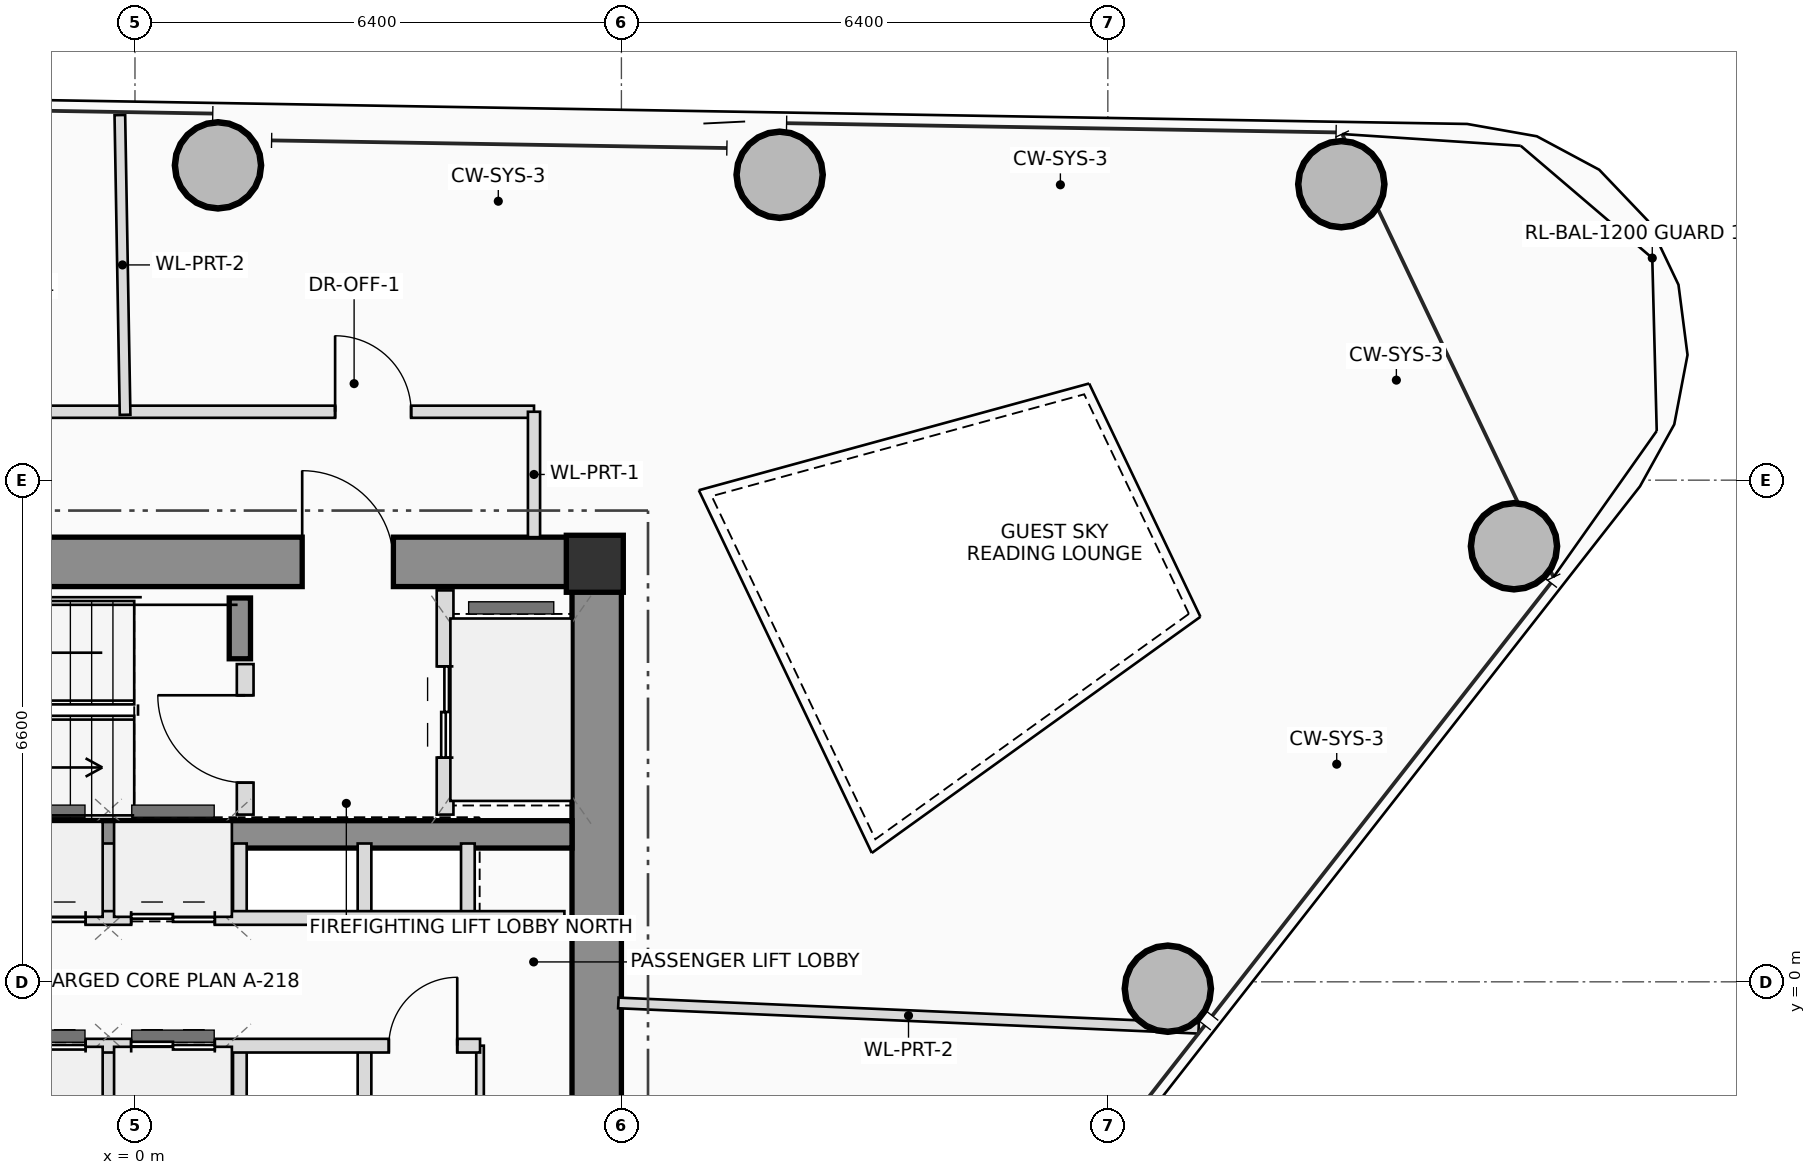
"""IFC4 building model, lengths in metres.
Left out: names, types, materials, properties, quantities, classifications, styles, units other than length and angle.
Written with IfcOpenShell. Run it as: python <this file> out.ifc"""

import sys

from ifc_helpers import new_model, si_unit, direction, frame, frame_2d, origin, origin_2d, place, context, subcontext, project, spatial, rectangle, hollow_circle, extrude, source, transform, mapped, element, fill, save


model = new_model("IFC4")
c1 = context("Model", 3, precision=1e-05, world=origin(), true_north=direction((0.0, 1.0)))
c2 = subcontext(c1, "Body", "Model", "MODEL_VIEW")
j1 = project(units=[si_unit("LENGTHUNIT", "METRE"), si_unit("PLANEANGLEUNIT", "RADIAN")], contexts=[c1])
p1 = place(None, origin())
s1 = spatial("IfcSite", under=j1, at=p1, CompositionType="ELEMENT")
p2 = place(p1, origin())
s2 = spatial("IfcBuilding", under=s1, at=p2, CompositionType="ELEMENT")
p3 = place(p2, frame((0.0, 0.0, 198.35)))
s3 = spatial("IfcBuildingStorey", under=s2, at=p3, CompositionType="ELEMENT", Elevation=198.35)
m1 = source(origin(), c2, "Body", "SweptSolid", [
    extrude(rectangle(XDim=0.75, YDim=0.75, at=origin_2d()), origin(), (0.0, 0.0, 1.0), 3.45),
])
p4 = place(p3, frame((6.05, 5.5, 0.0), z_axis=(0.0, 0.0, 1.0), x_axis=(1.0, 0.0, 0.0)))
e1 = element("IfcColumn", 1, at=p4, inside=s3, PredefinedType="COLUMN", context=c2, shape_type="MappedRepresentation", body=[
    mapped(m1, transform((0.0, 0.0, 0.0), scale=1.0)),
])
p5 = place(p3, frame((-6.4, 5.525, 0.0), z_axis=(0.0, 0.0, 1.0), x_axis=(1.0, 0.0, 0.0)))
e2 = element("IfcWall", 2, at=p5, inside=s3, PredefinedType="SHEAR", context=c2, shape_type="SweptSolid", body=[
    extrude(rectangle(XDim=12.8, YDim=0.65, at=frame_2d((6.4, 0.0))), origin(), (0.0, 0.0, 1.0), 3.45),
])
p6 = place(p5, frame((8.6, 0.0, 0.0)))
e3 = element("IfcOpeningElement", 3, at=p6, cuts=e2, PredefinedType="OPENING", context=c2, shape_type="SweptSolid", body=[
    extrude(rectangle(XDim=1.2, YDim=2.2, at=frame_2d((0.6, 1.1))), frame((0.0, 0.335, 0.0), z_axis=(0.0, -1.0, 0.0), x_axis=(1.0, 0.0, 0.0)), (0.0, 0.0, 1.0), 0.67),
])
p7 = place(p3, frame((6.075, -5.2, 0.0), z_axis=(0.0, 0.0, 1.0), x_axis=(0.0, 1.0, 0.0)))
e4 = element("IfcWall", 4, at=p7, inside=s3, PredefinedType="SHEAR", context=c2, shape_type="SweptSolid", body=[
    extrude(rectangle(XDim=10.4, YDim=0.65, at=frame_2d((5.2, 0.0))), origin(), (0.0, 0.0, 1.0), 3.45),
])
p8 = place(p3, frame((-5.75, 1.94, 0.0), z_axis=(0.0, 0.0, 1.0), x_axis=(1.0, 0.0, 0.0)))
e5 = element("IfcWall", 5, at=p8, inside=s3, PredefinedType="SHEAR", context=c2, shape_type="SweptSolid", body=[
    extrude(rectangle(XDim=11.5, YDim=0.36, at=frame_2d((5.75, 0.0))), origin(), (0.0, 0.0, 1.0), 3.45),
])
p9 = place(p3, frame((1.38, 4.25, 0.0), z_axis=(0.0, 0.0, 1.0), x_axis=(0.0, 1.0, 0.0)))
e6 = element("IfcWall", 6, at=p9, inside=s3, PredefinedType="SHEAR", context=c2, shape_type="SweptSolid", body=[
    extrude(rectangle(XDim=0.8, YDim=0.28, at=frame_2d((0.4, 0.0))), origin(), (0.0, 0.0, 1.0), 3.45),
])
m2 = source(origin(), c2, "Body", "SweptSolid", [
    extrude(hollow_circle(Radius=0.575, WallThickness=0.042, at=origin_2d()), origin(), (0.0, 0.0, 1.0), 3.45),
])
for number, where, z_axis, x_axis in (
    (7, (13.59, -0.09, 0.0), (0.0, 0.0, 1.0), (1.0, 0.0, 0.0)),
    (8, (18.144, 5.731, 0.0), (0.0, 0.0, 1.0), (1.0, 0.0, 0.0)),
    (9, (15.872, 10.494, 0.0), (0.0, 0.0, 1.0), (1.0, 0.0, 0.0)),
    (10, (8.482, 10.618, 0.0), (0.0, 0.0, 1.0), (1.0, 0.0, 0.0)),
    (11, (1.092, 10.742, 0.0), (0.0, 0.0, 1.0), (1.0, 0.0, 0.0)),
):
    element("IfcColumn", number, at=place(p3, frame(where, z_axis=z_axis, x_axis=x_axis)), inside=s3, PredefinedType="COLUMN", context=c2, shape_type="MappedRepresentation", body=[
        mapped(m2, transform((0.0, 0.0, 0.0), scale=1.0)),
    ])
p10 = place(p3, frame((1.45, 2.2, 0.0), z_axis=(0.0, 0.0, 1.0), x_axis=(0.0, 1.0, 0.0)))
e12 = element("IfcWall", 12, at=p10, inside=s3, PredefinedType="PLUMBINGWALL", context=c2, shape_type="SweptSolid", body=[
    extrude(rectangle(XDim=1.98, YDim=0.22, at=frame_2d((0.99, 0.0))), origin(), (0.0, 0.0, 1.0), 3.25),
])
p11 = place(p10, frame((0.42, 0.0, 0.0)))
e13 = element("IfcOpeningElement", 13, at=p11, cuts=e12, PredefinedType="OPENING", context=c2, shape_type="SweptSolid", body=[
    extrude(rectangle(XDim=1.15, YDim=2.15, at=frame_2d((0.575, 1.075))), frame((0.0, 0.12, 0.0), z_axis=(0.0, -1.0, 0.0), x_axis=(1.0, 0.0, 0.0)), (0.0, 0.0, 1.0), 0.24),
])
p12 = place(p3, frame((4.08, 2.2, 0.0), z_axis=(0.0, 0.0, 1.0), x_axis=(0.0, 1.0, 0.0)))
e14 = element("IfcWall", 14, at=p12, inside=s3, PredefinedType="PLUMBINGWALL", context=c2, shape_type="SweptSolid", body=[
    extrude(rectangle(XDim=2.95, YDim=0.22, at=frame_2d((1.475, 0.0))), origin(), (0.0, 0.0, 1.0), 3.25),
])
p13 = place(p12, frame((0.75, 0.0, 0.0)))
e15 = element("IfcOpeningElement", 15, at=p13, cuts=e14, PredefinedType="OPENING", context=c2, shape_type="SweptSolid", body=[
    extrude(rectangle(XDim=1.2, YDim=2.25, at=frame_2d((0.6, 1.125))), frame((0.0, 0.12, 0.0), z_axis=(0.0, -1.0, 0.0), x_axis=(1.0, 0.0, 0.0)), (0.0, 0.0, 1.0), 0.24),
])
for number, where, z_axis, x_axis in (
    (16, (-0.35, 0.84, 0.0), (0.0, 0.0, 1.0), (0.0, 1.0, 0.0)),
    (17, (-0.35, -1.82, 0.0), (0.0, 0.0, 1.0), (0.0, 1.0, 0.0)),
    (18, (1.38, 0.84, 0.0), (0.0, 0.0, 1.0), (0.0, 1.0, 0.0)),
    (19, (1.38, -1.82, 0.0), (0.0, 0.0, 1.0), (0.0, 1.0, 0.0)),
    (20, (3.02, 0.84, 0.0), (0.0, 0.0, 1.0), (0.0, 1.0, 0.0)),
    (21, (4.38, 0.84, 0.0), (0.0, 0.0, 1.0), (0.0, 1.0, 0.0)),
    (22, (3.02, -1.82, 0.0), (0.0, 0.0, 1.0), (0.0, 1.0, 0.0)),
):
    element("IfcWall", number, at=place(p3, frame(where, z_axis=z_axis, x_axis=x_axis)), inside=s3, PredefinedType="PLUMBINGWALL", context=c2, shape_type="SweptSolid", body=[
        extrude(rectangle(XDim=0.98, YDim=0.18, at=frame_2d((0.49, 0.0))), origin(), (0.0, 0.0, 1.0), 3.25),
    ])
p14 = place(p3, frame((4.54, -1.82, 0.0), z_axis=(0.0, 0.0, 1.0), x_axis=(0.0, 1.0, 0.0)))
e23 = element("IfcWall", 23, at=p14, inside=s3, PredefinedType="PARTITIONING", context=c2, shape_type="SweptSolid", body=[
    extrude(rectangle(XDim=0.98, YDim=0.1, at=frame_2d((0.49, 0.0))), origin(), (0.0, 0.0, 1.0), 3.25),
])
p15 = place(p3, frame((-5.68, 0.84, 0.0), z_axis=(0.0, 0.0, 1.0), x_axis=(1.0, 0.0, 0.0)))
e24 = element("IfcWall", 24, at=p15, inside=s3, PredefinedType="PLUMBINGWALL", context=c2, shape_type="SweptSolid", body=[
    extrude(rectangle(XDim=11.33, YDim=0.18, at=frame_2d((5.665, 0.0))), origin(), (0.0, 0.0, 1.0), 3.25),
])
p16 = place(p15, frame((1.38, 0.0, 0.0)))
e25 = element("IfcOpeningElement", 25, at=p16, cuts=e24, PredefinedType="OPENING", context=c2, shape_type="SweptSolid", body=[
    extrude(rectangle(XDim=0.9, YDim=2.05, at=frame_2d((0.45, 1.025))), frame((0.0, 0.1, 0.0), z_axis=(0.0, -1.0, 0.0), x_axis=(1.0, 0.0, 0.0)), (0.0, 0.0, 1.0), 0.2),
])
p17 = place(p15, frame((3.93, 0.0, 0.0)))
e26 = element("IfcOpeningElement", 26, at=p17, cuts=e24, PredefinedType="OPENING", context=c2, shape_type="SweptSolid", body=[
    extrude(rectangle(XDim=1.1, YDim=2.2, at=frame_2d((0.55, 1.1))), frame((0.0, 0.1, 0.0), z_axis=(0.0, -1.0, 0.0), x_axis=(1.0, 0.0, 0.0)), (0.0, 0.0, 1.0), 0.2),
])
p18 = place(p15, frame((5.63, 0.0, 0.0)))
e27 = element("IfcOpeningElement", 27, at=p18, cuts=e24, PredefinedType="OPENING", context=c2, shape_type="SweptSolid", body=[
    extrude(rectangle(XDim=1.1, YDim=2.2, at=frame_2d((0.55, 1.1))), frame((0.0, 0.1, 0.0), z_axis=(0.0, -1.0, 0.0), x_axis=(1.0, 0.0, 0.0)), (0.0, 0.0, 1.0), 0.2),
])
p19 = place(p3, frame((-5.68, -0.84, 0.0), z_axis=(0.0, 0.0, 1.0), x_axis=(1.0, 0.0, 0.0)))
e28 = element("IfcWall", 28, at=p19, inside=s3, PredefinedType="PLUMBINGWALL", context=c2, shape_type="SweptSolid", body=[
    extrude(rectangle(XDim=10.22, YDim=0.18, at=frame_2d((5.11, 0.0))), origin(), (0.0, 0.0, 1.0), 3.25),
])
p20 = place(p19, frame((1.38, 0.0, 0.0)))
e29 = element("IfcOpeningElement", 29, at=p20, cuts=e28, PredefinedType="OPENING", context=c2, shape_type="SweptSolid", body=[
    extrude(rectangle(XDim=0.9, YDim=2.05, at=frame_2d((0.45, 1.025))), frame((0.0, 0.1, 0.0), z_axis=(0.0, -1.0, 0.0), x_axis=(1.0, 0.0, 0.0)), (0.0, 0.0, 1.0), 0.2),
])
p21 = place(p19, frame((3.93, 0.0, 0.0)))
e30 = element("IfcOpeningElement", 30, at=p21, cuts=e28, PredefinedType="OPENING", context=c2, shape_type="SweptSolid", body=[
    extrude(rectangle(XDim=1.1, YDim=2.2, at=frame_2d((0.55, 1.1))), frame((0.0, 0.1, 0.0), z_axis=(0.0, -1.0, 0.0), x_axis=(1.0, 0.0, 0.0)), (0.0, 0.0, 1.0), 0.2),
])
p22 = place(p19, frame((5.63, 0.0, 0.0)))
e31 = element("IfcOpeningElement", 31, at=p22, cuts=e28, PredefinedType="OPENING", context=c2, shape_type="SweptSolid", body=[
    extrude(rectangle(XDim=1.1, YDim=2.2, at=frame_2d((0.55, 1.1))), frame((0.0, 0.1, 0.0), z_axis=(0.0, -1.0, 0.0), x_axis=(1.0, 0.0, 0.0)), (0.0, 0.0, 1.0), 0.2),
])
p23 = place(p19, frame((9.02, 0.0, 0.0)))
e32 = element("IfcOpeningElement", 32, at=p23, cuts=e28, PredefinedType="OPENING", context=c2, shape_type="SweptSolid", body=[
    extrude(rectangle(XDim=0.9, YDim=2.05, at=frame_2d((0.45, 1.025))), frame((0.0, 0.1, 0.0), z_axis=(0.0, -1.0, 0.0), x_axis=(1.0, 0.0, 0.0)), (0.0, 0.0, 1.0), 0.2),
])
p24 = place(p3, frame((-6.36, 7.5, 0.0), z_axis=(0.0, 0.0, 1.0), x_axis=(1.0, 0.0, 0.0)))
e33 = element("IfcWall", 33, at=p24, inside=s3, PredefinedType="PARTITIONING", context=c2, shape_type="SweptSolid", body=[
    extrude(rectangle(XDim=11.61, YDim=0.16, at=frame_2d((5.805, 0.0))), origin(), (0.0, 0.0, 1.0), 2.605),
])
p25 = place(p24, frame((3.948, 0.0, 0.0)))
e34 = element("IfcOpeningElement", 34, at=p25, cuts=e33, PredefinedType="OPENING", context=c2, shape_type="SweptSolid", body=[
    extrude(rectangle(XDim=1.0, YDim=2.25, at=frame_2d((0.5, 1.125))), frame((0.0, 0.09, 0.0), z_axis=(0.0, -1.0, 0.0), x_axis=(1.0, 0.0, 0.0)), (0.0, 0.0, 1.0), 0.18),
])
p26 = place(p24, frame((8.993, 0.0, 0.0)))
e35 = element("IfcOpeningElement", 35, at=p26, cuts=e33, PredefinedType="OPENING", context=c2, shape_type="SweptSolid", body=[
    extrude(rectangle(XDim=1.0, YDim=2.25, at=frame_2d((0.5, 1.125))), frame((0.0, 0.09, 0.0), z_axis=(0.0, -1.0, 0.0), x_axis=(1.0, 0.0, 0.0)), (0.0, 0.0, 1.0), 0.18),
])
p27 = place(p3, frame((5.25, 7.5, 0.0), z_axis=(0.0, 0.0, 1.0), x_axis=(0.0, -1.0, 0.0)))
e36 = element("IfcWall", 36, at=p27, inside=s3, PredefinedType="PARTITIONING", context=c2, shape_type="SweptSolid", body=[
    extrude(rectangle(XDim=1.65, YDim=0.16, at=frame_2d((0.825, 0.0))), origin(), (0.0, 0.0, 1.0), 2.605),
])
p28 = place(p3, frame((6.36, -0.278, 0.0), z_axis=(0.0, 0.0, 1.0), x_axis=(0.999047276506, -0.04364102778, 0.0)))
e37 = element("IfcWall", 37, at=p28, inside=s3, PredefinedType="PARTITIONING", context=c2, shape_type="SweptSolid", body=[
    extrude(rectangle(XDim=7.642, YDim=0.14, at=frame_2d((3.821, 0.0))), origin(), (0.0, 0.0, 1.0), 2.605),
])
p29 = place(p3, frame((-0.13, 7.46, 0.0), z_axis=(0.0, 0.0, 1.0), x_axis=(-0.017456477835, 0.999847624082, 0.0)))
e38 = element("IfcWall", 38, at=p29, inside=s3, PredefinedType="PARTITIONING", context=c2, shape_type="SweptSolid", body=[
    extrude(rectangle(XDim=3.944, YDim=0.14, at=frame_2d((1.972, 0.0))), origin(), (0.0, 0.0, 1.0), 2.765),
])
p30 = place(p6, origin())
e39 = element("IfcDoor", 39, at=p30, inside=s3, OperationType="SINGLE_SWING_LEFT", PredefinedType="DOOR", context=c2, shape_type="SweptSolid", body=[
    extrude(rectangle(XDim=1.2, YDim=2.2, at=frame_2d((0.6, 1.1))), frame((0.0, 0.025, 0.0), z_axis=(0.0, -1.0, 0.0), x_axis=(1.0, 0.0, 0.0)), (0.0, 0.0, 1.0), 0.05),
])
fill(e3, e39)
p31 = place(p11, origin())
e40 = element("IfcDoor", 40, at=p31, inside=s3, OperationType="SINGLE_SWING_RIGHT", PredefinedType="DOOR", context=c2, shape_type="SweptSolid", body=[
    extrude(rectangle(XDim=1.15, YDim=2.15, at=frame_2d((0.575, 1.075))), frame((0.0, 0.025, 0.0), z_axis=(0.0, -1.0, 0.0), x_axis=(1.0, 0.0, 0.0)), (0.0, 0.0, 1.0), 0.05),
])
fill(e13, e40)
p32 = place(p13, origin())
e41 = element("IfcDoor", 41, at=p32, inside=s3, OperationType="DOUBLE_DOOR_SLIDING", PredefinedType="DOOR", context=c2, shape_type="SweptSolid", body=[
    extrude(rectangle(XDim=1.2, YDim=2.25, at=frame_2d((0.6, 1.125))), frame((0.0, 0.025, 0.0), z_axis=(0.0, -1.0, 0.0), x_axis=(1.0, 0.0, 0.0)), (0.0, 0.0, 1.0), 0.05),
])
fill(e15, e41)
p33 = place(p17, origin())
e42 = element("IfcDoor", 42, at=p33, inside=s3, OperationType="DOUBLE_DOOR_SLIDING", PredefinedType="DOOR", context=c2, shape_type="SweptSolid", body=[
    extrude(rectangle(XDim=1.1, YDim=2.2, at=frame_2d((0.55, 1.1))), frame((0.0, 0.025, 0.0), z_axis=(0.0, -1.0, 0.0), x_axis=(1.0, 0.0, 0.0)), (0.0, 0.0, 1.0), 0.05),
])
fill(e26, e42)
p34 = place(p18, origin())
e43 = element("IfcDoor", 43, at=p34, inside=s3, OperationType="DOUBLE_DOOR_SLIDING", PredefinedType="DOOR", context=c2, shape_type="SweptSolid", body=[
    extrude(rectangle(XDim=1.1, YDim=2.2, at=frame_2d((0.55, 1.1))), frame((0.0, 0.025, 0.0), z_axis=(0.0, -1.0, 0.0), x_axis=(1.0, 0.0, 0.0)), (0.0, 0.0, 1.0), 0.05),
])
fill(e27, e43)
p35 = place(p21, origin())
e44 = element("IfcDoor", 44, at=p35, inside=s3, OperationType="DOUBLE_DOOR_SLIDING", PredefinedType="DOOR", context=c2, shape_type="SweptSolid", body=[
    extrude(rectangle(XDim=1.1, YDim=2.2, at=frame_2d((0.55, 1.1))), frame((0.0, 0.025, 0.0), z_axis=(0.0, -1.0, 0.0), x_axis=(1.0, 0.0, 0.0)), (0.0, 0.0, 1.0), 0.05),
])
fill(e30, e44)
p36 = place(p22, origin())
e45 = element("IfcDoor", 45, at=p36, inside=s3, OperationType="DOUBLE_DOOR_SLIDING", PredefinedType="DOOR", context=c2, shape_type="SweptSolid", body=[
    extrude(rectangle(XDim=1.1, YDim=2.2, at=frame_2d((0.55, 1.1))), frame((0.0, 0.025, 0.0), z_axis=(0.0, -1.0, 0.0), x_axis=(1.0, 0.0, 0.0)), (0.0, 0.0, 1.0), 0.05),
])
fill(e31, e45)
p37 = place(p23, origin())
e46 = element("IfcDoor", 46, at=p37, inside=s3, OperationType="SINGLE_SWING_RIGHT", PredefinedType="DOOR", context=c2, shape_type="SweptSolid", body=[
    extrude(rectangle(XDim=0.9, YDim=2.05, at=frame_2d((0.45, 1.025))), frame((0.0, 0.025, 0.0), z_axis=(0.0, -1.0, 0.0), x_axis=(1.0, 0.0, 0.0)), (0.0, 0.0, 1.0), 0.05),
])
fill(e32, e46)
p38 = place(p26, origin())
e47 = element("IfcDoor", 47, at=p38, inside=s3, OperationType="SINGLE_SWING_LEFT", PredefinedType="DOOR", context=c2, shape_type="SweptSolid", body=[
    extrude(rectangle(XDim=1.0, YDim=2.25, at=frame_2d((0.5, 1.125))), frame((0.0, 0.025, 0.0), z_axis=(0.0, -1.0, 0.0), x_axis=(1.0, 0.0, 0.0)), (0.0, 0.0, 1.0), 0.05),
])
fill(e35, e47)
save(model, sys.argv[1])
